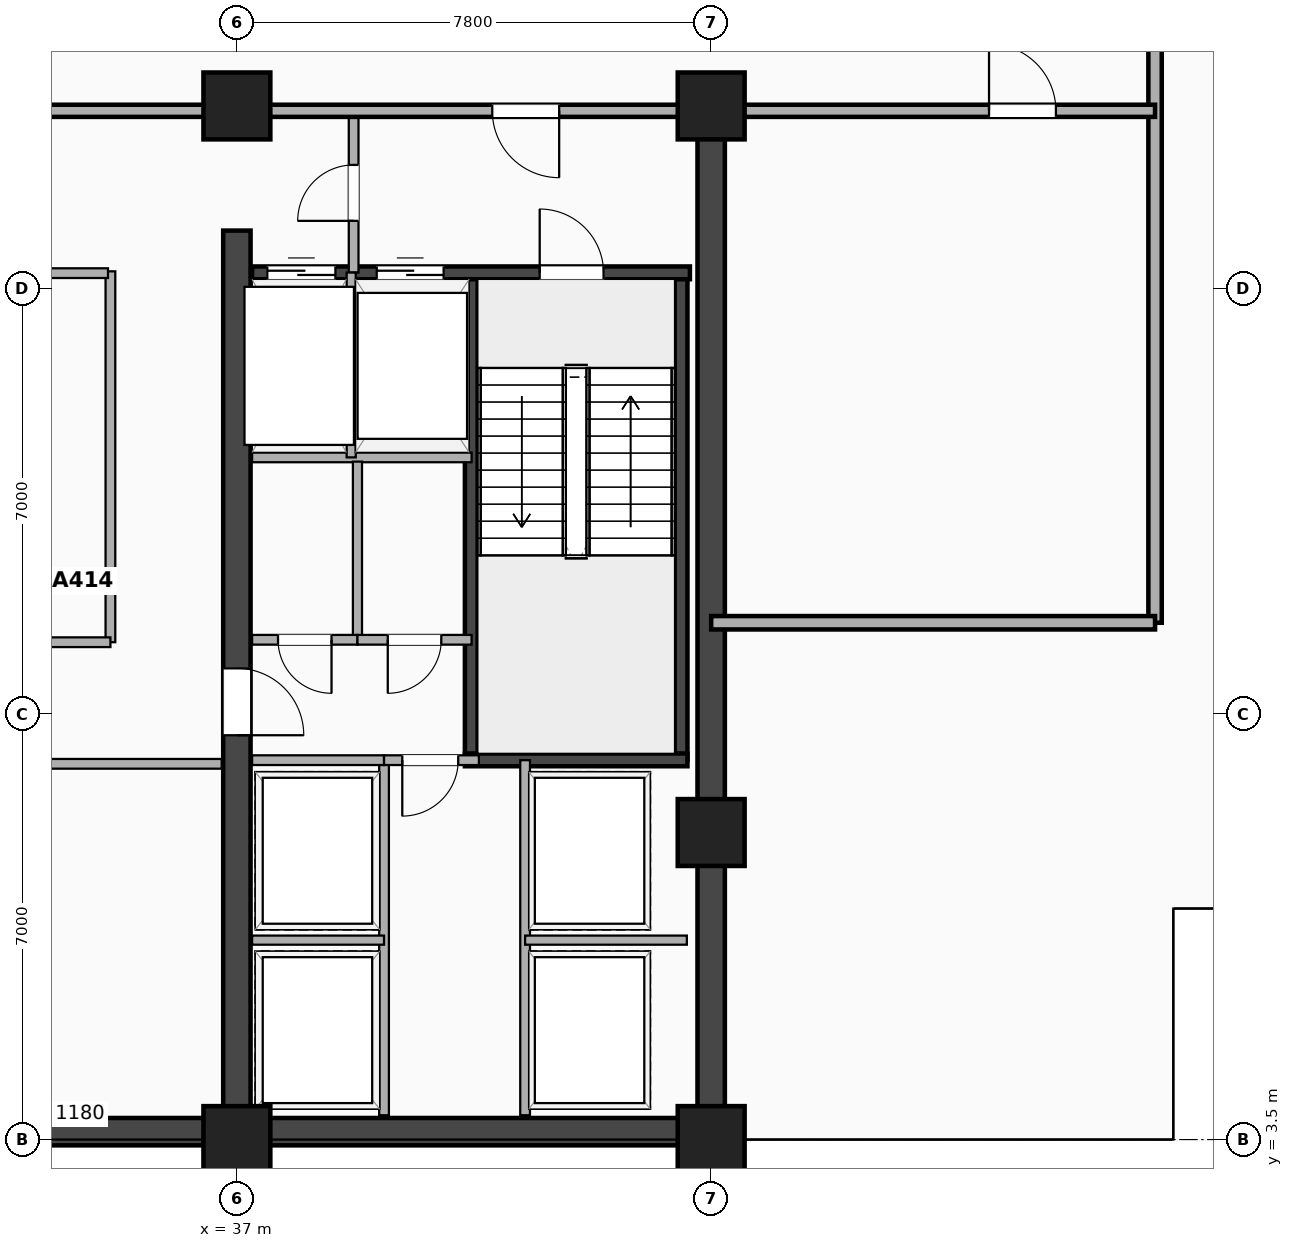
"""IFC4 building model, lengths in metres.
Left out: names, types, materials, properties, quantities, classifications, styles, units other than length and angle.
Written with IfcOpenShell. Run it as: python <this file> out.ifc"""

import sys

from ifc_helpers import new_model, si_unit, direction, frame, frame_2d, origin, origin_2d, place, context, subcontext, project, spatial, rectangle, extrude, element, fill, save


model = new_model("IFC4")
c1 = context("Model", 3, precision=1e-05, world=origin(), true_north=direction((0.0, 1.0)))
c2 = subcontext(c1, "Body", "Model", "MODEL_VIEW")
j1 = project(units=[si_unit("LENGTHUNIT", "METRE"), si_unit("PLANEANGLEUNIT", "RADIAN")], contexts=[c1])
p1 = place(None, origin())
s1 = spatial("IfcSite", under=j1, at=p1, CompositionType="ELEMENT")
p2 = place(p1, origin())
s2 = spatial("IfcBuilding", under=s1, at=p2, CompositionType="ELEMENT")
p3 = place(p2, frame((0.0, 0.0, 184.1)))
s3 = spatial("IfcBuildingStorey", under=s2, at=p3, CompositionType="ELEMENT", Elevation=184.1)
p4 = place(p3, frame((20.3, 3.63, 0.0), z_axis=(0.0, 0.0, 1.0), x_axis=(1.0, 0.0, 0.0)))
e1 = element("IfcWall", 1, at=p4, inside=s3, PredefinedType="SHEAR", context=c2, shape_type="SweptSolid", body=[
    extrude(rectangle(XDim=24.5, YDim=0.45, at=frame_2d((12.25, 0.0))), origin(), (0.0, 0.0, 1.0), 8.16),
])
p5 = place(p3, frame((44.8, 3.5, 0.0), z_axis=(0.0, 0.0, 1.0), x_axis=(0.0, 1.0, 0.0)))
e2 = element("IfcWall", 2, at=p5, inside=s3, PredefinedType="SHEAR", context=c2, shape_type="SweptSolid", body=[
    extrude(rectangle(XDim=16.9, YDim=0.45, at=frame_2d((8.45, 0.0))), origin(), (0.0, 0.0, 1.0), 8.16),
])
p6 = place(p3, frame((37.0, 3.5, 0.0), z_axis=(0.0, 0.0, 1.0), x_axis=(0.0, 1.0, 0.0)))
e3 = element("IfcWall", 3, at=p6, inside=s3, PredefinedType="SHEAR", context=c2, shape_type="SweptSolid", body=[
    extrude(rectangle(XDim=14.95, YDim=0.45, at=frame_2d((7.475, 0.0))), origin(), (0.0, 0.0, 1.0), 8.16),
])
p7 = place(p6, frame((6.65, 0.0, 0.0)))
e4 = element("IfcOpeningElement", 4, at=p7, cuts=e3, PredefinedType="OPENING", context=c2, shape_type="SweptSolid", body=[
    extrude(rectangle(XDim=1.1, YDim=2.15, at=frame_2d((0.55, 1.075))), frame((0.0, 0.235, 0.0), z_axis=(0.0, -1.0, 0.0), x_axis=(1.0, 0.0, 0.0)), (0.0, 0.0, 1.0), 0.47),
])
for number, where, z_axis, x_axis in (
    (5, (40.855, 9.745, 0.0), (0.0, 0.0, 1.0), (0.0, 1.0, 0.0)),
    (6, (44.305, 9.745, 0.0), (0.0, 0.0, 1.0), (0.0, 1.0, 0.0)),
):
    element("IfcWall", number, at=place(p3, frame(where, z_axis=z_axis, x_axis=x_axis)), inside=s3, PredefinedType="SHEAR", context=c2, shape_type="SweptSolid", body=[
        extrude(rectangle(XDim=8.01, YDim=0.21, at=frame_2d((4.005, 0.0))), origin(), (0.0, 0.0, 1.0), 8.16),
    ])
p8 = place(p3, frame((40.75, 9.745, 0.0), z_axis=(0.0, 0.0, 1.0), x_axis=(1.0, 0.0, 0.0)))
e7 = element("IfcWall", 7, at=p8, inside=s3, PredefinedType="SHEAR", context=c2, shape_type="SweptSolid", body=[
    extrude(rectangle(XDim=3.66, YDim=0.21, at=frame_2d((1.83, 0.0))), origin(), (0.0, 0.0, 1.0), 8.16),
])
p9 = place(p3, frame((37.25, 17.755, 0.0), z_axis=(0.0, 0.0, 1.0), x_axis=(1.0, 0.0, 0.0)))
e8 = element("IfcWall", 8, at=p9, inside=s3, PredefinedType="SHEAR", context=c2, shape_type="SweptSolid", body=[
    extrude(rectangle(XDim=7.2, YDim=0.21, at=frame_2d((3.6, 0.0))), origin(), (0.0, 0.0, 1.0), 8.16),
])
p10 = place(p9, frame((0.25, 0.0, 0.0)))
e9 = element("IfcOpeningElement", 9, at=p10, cuts=e8, PredefinedType="OPENING", context=c2, shape_type="SweptSolid", body=[
    extrude(rectangle(XDim=1.12, YDim=2.2, at=frame_2d((0.56, 1.1))), frame((0.0, 0.115, 0.0), z_axis=(0.0, -1.0, 0.0), x_axis=(1.0, 0.0, 0.0)), (0.0, 0.0, 1.0), 0.23),
])
p11 = place(p9, frame((2.05, 0.0, 0.0)))
e10 = element("IfcOpeningElement", 10, at=p11, cuts=e8, PredefinedType="OPENING", context=c2, shape_type="SweptSolid", body=[
    extrude(rectangle(XDim=1.1, YDim=2.18, at=frame_2d((0.55, 1.09))), frame((0.0, 0.115, 0.0), z_axis=(0.0, -1.0, 0.0), x_axis=(1.0, 0.0, 0.0)), (0.0, 0.0, 1.0), 0.23),
])
p12 = place(p9, frame((5.78, 0.0, 0.0), z_axis=(0.0, 0.0, 1.0), x_axis=(-1.0, 0.0, 0.0)))
e11 = element("IfcOpeningElement", 11, at=p12, cuts=e8, PredefinedType="OPENING", context=c2, shape_type="SweptSolid", body=[
    extrude(rectangle(XDim=1.05, YDim=2.15, at=frame_2d((0.525, 1.075))), frame((0.0, 0.115, 0.0), z_axis=(0.0, -1.0, 0.0), x_axis=(1.0, 0.0, 0.0)), (0.0, 0.0, 1.0), 0.23),
])
for number, where, z_axis, x_axis in (
    (12, (37.0, 3.5, -0.32), (0.0, 0.0, 1.0), (1.0, 0.0, 0.0)),
    (13, (44.8, 3.5, -0.32), (0.0, 0.0, 1.0), (1.0, 0.0, 0.0)),
    (14, (44.8, 8.55, -0.32), (0.0, 0.0, 1.0), (1.0, 0.0, 0.0)),
    (15, (37.0, 20.5, -0.32), (0.0, 0.0, 1.0), (1.0, 0.0, 0.0)),
    (16, (44.8, 20.5, -0.32), (0.0, 0.0, 1.0), (1.0, 0.0, 0.0)),
):
    element("IfcColumn", number, at=place(p3, frame(where, z_axis=z_axis, x_axis=x_axis)), inside=s3, PredefinedType="COLUMN", context=c2, shape_type="SweptSolid", body=[
        extrude(rectangle(XDim=1.1, YDim=1.1, at=origin_2d()), origin(), (0.0, 0.0, 1.0), 8.48),
    ])
p13 = place(p3, frame((38.92, 17.76, 0.0), z_axis=(0.0, 0.0, 1.0), x_axis=(0.0, 1.0, 0.0)))
e17 = element("IfcWall", 17, at=p13, inside=s3, PredefinedType="PARTITIONING", context=c2, shape_type="SweptSolid", body=[
    extrude(rectangle(XDim=2.66, YDim=0.16, at=frame_2d((1.33, 0.0))), origin(), (0.0, 0.0, 1.0), 7.602),
])
p14 = place(p13, frame((1.77, 0.0, 0.0), z_axis=(0.0, 0.0, 1.0), x_axis=(-1.0, 0.0, 0.0)))
e18 = element("IfcOpeningElement", 18, at=p14, cuts=e17, PredefinedType="OPENING", context=c2, shape_type="SweptSolid", body=[
    extrude(rectangle(XDim=0.92, YDim=2.08, at=frame_2d((0.46, 1.04))), frame((0.0, 0.09, 0.0), z_axis=(0.0, -1.0, 0.0), x_axis=(1.0, 0.0, 0.0)), (0.0, 0.0, 1.0), 0.18),
])
p15 = place(p3, frame((37.25, 14.72, 0.0), z_axis=(0.0, 0.0, 1.0), x_axis=(1.0, 0.0, 0.0)))
e19 = element("IfcWall", 19, at=p15, inside=s3, PredefinedType="PARTITIONING", context=c2, shape_type="SweptSolid", body=[
    extrude(rectangle(XDim=3.61, YDim=0.16, at=frame_2d((1.805, 0.0))), origin(), (0.0, 0.0, 1.0), 8.16),
])
p16 = place(p3, frame((38.88, 14.72, 0.0), z_axis=(0.0, 0.0, 1.0), x_axis=(0.0, 1.0, 0.0)))
e20 = element("IfcWall", 20, at=p16, inside=s3, PredefinedType="PARTITIONING", context=c2, shape_type="SweptSolid", body=[
    extrude(rectangle(XDim=3.04, YDim=0.15, at=frame_2d((1.52, 0.0))), origin(), (0.0, 0.0, 1.0), 8.16),
])
p17 = place(p3, frame((29.2, 20.42, 0.0), z_axis=(0.0, 0.0, 1.0), x_axis=(1.0, 0.0, 0.0)))
e21 = element("IfcWall", 21, at=p17, inside=s3, PredefinedType="PARTITIONING", context=c2, shape_type="SweptSolid", body=[
    extrude(rectangle(XDim=7.8, YDim=0.2, at=frame_2d((3.9, 0.0))), origin(), (0.0, 0.0, 1.0), 7.29),
])
p18 = place(p17, frame((3.409, 0.0, 0.0)))
e22 = element("IfcOpeningElement", 22, at=p18, cuts=e21, PredefinedType="OPENING", context=c2, shape_type="SweptSolid", body=[
    extrude(rectangle(XDim=1.1, YDim=2.15, at=frame_2d((0.55, 1.075))), frame((0.0, 0.11, 0.0), z_axis=(0.0, -1.0, 0.0), x_axis=(1.0, 0.0, 0.0)), (0.0, 0.0, 1.0), 0.22),
])
p19 = place(p3, frame((37.0, 20.42, 0.0), z_axis=(0.0, 0.0, 1.0), x_axis=(1.0, 0.0, 0.0)))
e23 = element("IfcWall", 23, at=p19, inside=s3, PredefinedType="PARTITIONING", context=c2, shape_type="SweptSolid", body=[
    extrude(rectangle(XDim=7.45, YDim=0.2, at=frame_2d((3.725, 0.0))), origin(), (0.0, 0.0, 1.0), 6.465),
])
p20 = place(p19, frame((4.2, 0.0, 0.0)))
e24 = element("IfcOpeningElement", 24, at=p20, cuts=e23, PredefinedType="OPENING", context=c2, shape_type="SweptSolid", body=[
    extrude(rectangle(XDim=1.1, YDim=2.15, at=frame_2d((0.55, 1.075))), frame((0.0, 0.11, 0.0), z_axis=(0.0, -1.0, 0.0), x_axis=(1.0, 0.0, 0.0)), (0.0, 0.0, 1.0), 0.22),
])
p21 = place(p3, frame((38.983, 11.72, 0.0), z_axis=(0.0, 0.0, 1.0), x_axis=(0.0, 1.0, 0.0)))
e25 = element("IfcWall", 25, at=p21, inside=s3, PredefinedType="PARTITIONING", context=c2, shape_type="SweptSolid", body=[
    extrude(rectangle(XDim=2.93, YDim=0.15, at=frame_2d((1.465, 0.0))), origin(), (0.0, 0.0, 1.0), 8.16),
])
p22 = place(p3, frame((37.25, 11.72, 0.0), z_axis=(0.0, 0.0, 1.0), x_axis=(1.0, 0.0, 0.0)))
e26 = element("IfcWall", 26, at=p22, inside=s3, PredefinedType="PARTITIONING", context=c2, shape_type="SweptSolid", body=[
    extrude(rectangle(XDim=1.733, YDim=0.16, at=frame_2d((0.866, 0.0))), origin(), (0.0, 0.0, 1.0), 8.16),
])
p23 = place(p22, frame((0.427, 0.0, 0.0)))
e27 = element("IfcOpeningElement", 27, at=p23, cuts=e26, PredefinedType="OPENING", context=c2, shape_type="SweptSolid", body=[
    extrude(rectangle(XDim=0.88, YDim=2.08, at=frame_2d((0.44, 1.04))), frame((0.0, 0.09, 0.0), z_axis=(0.0, -1.0, 0.0), x_axis=(1.0, 0.0, 0.0)), (0.0, 0.0, 1.0), 0.18),
])
p24 = place(p3, frame((38.983, 11.72, 0.0), z_axis=(0.0, 0.0, 1.0), x_axis=(1.0, 0.0, 0.0)))
e28 = element("IfcWall", 28, at=p24, inside=s3, PredefinedType="PARTITIONING", context=c2, shape_type="SweptSolid", body=[
    extrude(rectangle(XDim=1.877, YDim=0.16, at=frame_2d((0.938, 0.0))), origin(), (0.0, 0.0, 1.0), 8.16),
])
p25 = place(p24, frame((0.499, 0.0, 0.0)))
e29 = element("IfcOpeningElement", 29, at=p25, cuts=e28, PredefinedType="OPENING", context=c2, shape_type="SweptSolid", body=[
    extrude(rectangle(XDim=0.88, YDim=2.08, at=frame_2d((0.44, 1.04))), frame((0.0, 0.09, 0.0), z_axis=(0.0, -1.0, 0.0), x_axis=(1.0, 0.0, 0.0)), (0.0, 0.0, 1.0), 0.18),
])
for number, where, z_axis, x_axis in (
    (30, (39.42, 3.9, 0.0), (0.0, 0.0, 1.0), (0.0, 1.0, 0.0)),
    (31, (41.74, 3.9, 0.0), (0.0, 0.0, 1.0), (0.0, 1.0, 0.0)),
):
    element("IfcWall", number, at=place(p3, frame(where, z_axis=z_axis, x_axis=x_axis)), inside=s3, PredefinedType="PARTITIONING", context=c2, shape_type="SweptSolid", body=[
        extrude(rectangle(XDim=5.84, YDim=0.16, at=frame_2d((2.92, 0.0))), origin(), (0.0, 0.0, 1.0), 8.16),
    ])
p26 = place(p3, frame((37.25, 6.78, 0.0), z_axis=(0.0, 0.0, 1.0), x_axis=(1.0, 0.0, 0.0)))
e32 = element("IfcWall", 32, at=p26, inside=s3, PredefinedType="PARTITIONING", context=c2, shape_type="SweptSolid", body=[
    extrude(rectangle(XDim=2.17, YDim=0.15, at=frame_2d((1.085, 0.0))), origin(), (0.0, 0.0, 1.0), 8.16),
])
p27 = place(p3, frame((41.74, 6.78, 0.0), z_axis=(0.0, 0.0, 1.0), x_axis=(1.0, 0.0, 0.0)))
e33 = element("IfcWall", 33, at=p27, inside=s3, PredefinedType="PARTITIONING", context=c2, shape_type="SweptSolid", body=[
    extrude(rectangle(XDim=2.66, YDim=0.15, at=frame_2d((1.33, 0.0))), origin(), (0.0, 0.0, 1.0), 6.465),
])
p28 = place(p3, frame((37.25, 9.74, 0.0), z_axis=(0.0, 0.0, 1.0), x_axis=(1.0, 0.0, 0.0)))
e34 = element("IfcWall", 34, at=p28, inside=s3, PredefinedType="PARTITIONING", context=c2, shape_type="SweptSolid", body=[
    extrude(rectangle(XDim=2.17, YDim=0.16, at=frame_2d((1.085, 0.0))), origin(), (0.0, 0.0, 1.0), 8.16),
])
p29 = place(p3, frame((39.42, 9.74, 0.0), z_axis=(0.0, 0.0, 1.0), x_axis=(1.0, 0.0, 0.0)))
e35 = element("IfcWall", 35, at=p29, inside=s3, PredefinedType="PARTITIONING", context=c2, shape_type="SweptSolid", body=[
    extrude(rectangle(XDim=1.56, YDim=0.16, at=frame_2d((0.78, 0.0))), origin(), (0.0, 0.0, 1.0), 8.16),
])
p30 = place(p29, frame((0.3, 0.0, 0.0)))
e36 = element("IfcOpeningElement", 36, at=p30, cuts=e35, PredefinedType="OPENING", context=c2, shape_type="SweptSolid", body=[
    extrude(rectangle(XDim=0.92, YDim=2.08, at=frame_2d((0.46, 1.04))), frame((0.0, 0.09, 0.0), z_axis=(0.0, -1.0, 0.0), x_axis=(1.0, 0.0, 0.0)), (0.0, 0.0, 1.0), 0.18),
])
p31 = place(p3, frame((34.92, 11.68, 0.0), z_axis=(0.0, 0.0, 1.0), x_axis=(0.0, 1.0, 0.0)))
e37 = element("IfcWall", 37, at=p31, inside=s3, PredefinedType="PARTITIONING", context=c2, shape_type="SweptSolid", body=[
    extrude(rectangle(XDim=6.1, YDim=0.16, at=frame_2d((3.05, 0.0))), origin(), (0.0, 0.0, 1.0), 8.16),
])
p32 = place(p3, frame((29.45, 9.68, 0.0), z_axis=(0.0, 0.0, 1.0), x_axis=(1.0, 0.0, 0.0)))
e38 = element("IfcWall", 38, at=p32, inside=s3, PredefinedType="PARTITIONING", context=c2, shape_type="SweptSolid", body=[
    extrude(rectangle(XDim=7.3, YDim=0.16, at=frame_2d((3.65, 0.0))), origin(), (0.0, 0.0, 1.0), 8.16),
])
p33 = place(p32, frame((4.11, 0.0, 0.0), z_axis=(0.0, 0.0, 1.0), x_axis=(-1.0, 0.0, 0.0)))
e39 = element("IfcOpeningElement", 39, at=p33, cuts=e38, PredefinedType="OPENING", context=c2, shape_type="SweptSolid", body=[
    extrude(rectangle(XDim=0.92, YDim=2.08, at=frame_2d((0.46, 1.04))), frame((0.0, 0.09, 0.0), z_axis=(0.0, -1.0, 0.0), x_axis=(1.0, 0.0, 0.0)), (0.0, 0.0, 1.0), 0.18),
])
p34 = place(p3, frame((29.2, 11.68, 0.0), z_axis=(0.0, 0.0, 1.0), x_axis=(1.0, 0.0, 0.0)))
e40 = element("IfcWall", 40, at=p34, inside=s3, PredefinedType="PARTITIONING", context=c2, shape_type="SweptSolid", body=[
    extrude(rectangle(XDim=5.72, YDim=0.16, at=frame_2d((2.86, 0.0))), origin(), (0.0, 0.0, 1.0), 8.16),
])
p35 = place(p3, frame((29.45, 17.75, 0.0), z_axis=(0.0, 0.0, 1.0), x_axis=(1.0, 0.0, 0.0)))
e41 = element("IfcWall", 41, at=p35, inside=s3, PredefinedType="PARTITIONING", context=c2, shape_type="SweptSolid", body=[
    extrude(rectangle(XDim=5.43, YDim=0.16, at=frame_2d((2.715, 0.0))), origin(), (0.0, 0.0, 1.0), 8.16),
])
p36 = place(p35, frame((3.175, 0.0, 0.0), z_axis=(0.0, 0.0, 1.0), x_axis=(-1.0, 0.0, 0.0)))
e42 = element("IfcOpeningElement", 42, at=p36, cuts=e41, PredefinedType="OPENING", context=c2, shape_type="SweptSolid", body=[
    extrude(rectangle(XDim=0.92, YDim=2.08, at=frame_2d((0.46, 1.04))), frame((0.0, 0.09, 0.0), z_axis=(0.0, -1.0, 0.0), x_axis=(1.0, 0.0, 0.0)), (0.0, 0.0, 1.0), 0.18),
])
p37 = place(p3, frame((52.1, 12.0, 0.0), z_axis=(0.0, 0.0, 1.0), x_axis=(0.0, 1.0, 0.0)))
e43 = element("IfcWall", 43, at=p37, inside=s3, PredefinedType="PARTITIONING", context=c2, shape_type="SweptSolid", body=[
    extrude(rectangle(XDim=20.8, YDim=0.22, at=frame_2d((10.4, 0.0))), origin(), (0.0, 0.0, 1.0), 6.465),
])
p38 = place(p3, frame((44.8, 12.0, 0.0), z_axis=(0.0, 0.0, 1.0), x_axis=(1.0, 0.0, 0.0)))
e44 = element("IfcWall", 44, at=p38, inside=s3, PredefinedType="PARTITIONING", context=c2, shape_type="SweptSolid", body=[
    extrude(rectangle(XDim=7.3, YDim=0.22, at=frame_2d((3.65, 0.0))), origin(), (0.0, 0.0, 1.0), 6.465),
])
p39 = place(p3, frame((44.8, 20.42, 0.0), z_axis=(0.0, 0.0, 1.0), x_axis=(1.0, 0.0, 0.0)))
e45 = element("IfcWall", 45, at=p39, inside=s3, PredefinedType="PARTITIONING", context=c2, shape_type="SweptSolid", body=[
    extrude(rectangle(XDim=7.3, YDim=0.2, at=frame_2d((3.65, 0.0))), origin(), (0.0, 0.0, 1.0), 6.465),
])
p40 = place(p39, frame((5.669, 0.0, 0.0), z_axis=(0.0, 0.0, 1.0), x_axis=(-1.0, 0.0, 0.0)))
e46 = element("IfcOpeningElement", 46, at=p40, cuts=e45, PredefinedType="OPENING", context=c2, shape_type="SweptSolid", body=[
    extrude(rectangle(XDim=1.1, YDim=2.15, at=frame_2d((0.55, 1.075))), frame((0.0, 0.11, 0.0), z_axis=(0.0, -1.0, 0.0), x_axis=(1.0, 0.0, 0.0)), (0.0, 0.0, 1.0), 0.22),
])
p41 = place(p10, origin())
e47 = element("IfcDoor", 47, at=p41, inside=s3, OperationType="DOUBLE_DOOR_SLIDING", PredefinedType="DOOR", context=c2, shape_type="SweptSolid", body=[
    extrude(rectangle(XDim=1.12, YDim=2.2, at=frame_2d((0.56, 1.1))), frame((0.0, 0.025, 0.0), z_axis=(0.0, -1.0, 0.0), x_axis=(1.0, 0.0, 0.0)), (0.0, 0.0, 1.0), 0.05),
])
fill(e9, e47)
p42 = place(p11, origin())
e48 = element("IfcDoor", 48, at=p42, inside=s3, OperationType="DOUBLE_DOOR_SLIDING", PredefinedType="DOOR", context=c2, shape_type="SweptSolid", body=[
    extrude(rectangle(XDim=1.1, YDim=2.18, at=frame_2d((0.55, 1.09))), frame((0.0, 0.025, 0.0), z_axis=(0.0, -1.0, 0.0), x_axis=(1.0, 0.0, 0.0)), (0.0, 0.0, 1.0), 0.05),
])
fill(e10, e48)
p43 = place(p12, origin())
e49 = element("IfcDoor", 49, at=p43, inside=s3, OperationType="SINGLE_SWING_LEFT", PredefinedType="DOOR", context=c2, shape_type="SweptSolid", body=[
    extrude(rectangle(XDim=1.05, YDim=2.15, at=frame_2d((0.525, 1.075))), frame((0.0, 0.025, 0.0), z_axis=(0.0, -1.0, 0.0), x_axis=(1.0, 0.0, 0.0)), (0.0, 0.0, 1.0), 0.05),
])
fill(e11, e49)
p44 = place(p7, origin())
e50 = element("IfcDoor", 50, at=p44, inside=s3, OperationType="SINGLE_SWING_LEFT", PredefinedType="DOOR", context=c2, shape_type="SweptSolid", body=[
    extrude(rectangle(XDim=1.1, YDim=2.15, at=frame_2d((0.55, 1.075))), frame((0.0, 0.025, 0.0), z_axis=(0.0, -1.0, 0.0), x_axis=(1.0, 0.0, 0.0)), (0.0, 0.0, 1.0), 0.05),
])
fill(e4, e50)
p45 = place(p14, origin())
e51 = element("IfcDoor", 51, at=p45, inside=s3, OperationType="SINGLE_SWING_LEFT", PredefinedType="DOOR", context=c2, shape_type="SweptSolid", body=[
    extrude(rectangle(XDim=0.92, YDim=2.08, at=frame_2d((0.46, 1.04))), frame((0.0, 0.025, 0.0), z_axis=(0.0, -1.0, 0.0), x_axis=(1.0, 0.0, 0.0)), (0.0, 0.0, 1.0), 0.05),
])
fill(e18, e51)
p46 = place(p20, origin())
e52 = element("IfcDoor", 52, at=p46, inside=s3, OperationType="SINGLE_SWING_RIGHT", PredefinedType="DOOR", context=c2, shape_type="SweptSolid", body=[
    extrude(rectangle(XDim=1.1, YDim=2.15, at=frame_2d((0.55, 1.075))), frame((0.0, 0.025, 0.0), z_axis=(0.0, -1.0, 0.0), x_axis=(1.0, 0.0, 0.0)), (0.0, 0.0, 1.0), 0.05),
])
fill(e24, e52)
p47 = place(p23, origin())
e53 = element("IfcDoor", 53, at=p47, inside=s3, OperationType="SINGLE_SWING_RIGHT", PredefinedType="DOOR", context=c2, shape_type="SweptSolid", body=[
    extrude(rectangle(XDim=0.88, YDim=2.08, at=frame_2d((0.44, 1.04))), frame((0.0, 0.025, 0.0), z_axis=(0.0, -1.0, 0.0), x_axis=(1.0, 0.0, 0.0)), (0.0, 0.0, 1.0), 0.05),
])
fill(e27, e53)
p48 = place(p25, origin())
e54 = element("IfcDoor", 54, at=p48, inside=s3, OperationType="SINGLE_SWING_LEFT", PredefinedType="DOOR", context=c2, shape_type="SweptSolid", body=[
    extrude(rectangle(XDim=0.88, YDim=2.08, at=frame_2d((0.44, 1.04))), frame((0.0, 0.025, 0.0), z_axis=(0.0, -1.0, 0.0), x_axis=(1.0, 0.0, 0.0)), (0.0, 0.0, 1.0), 0.05),
])
fill(e29, e54)
p49 = place(p30, origin())
e55 = element("IfcDoor", 55, at=p49, inside=s3, OperationType="SINGLE_SWING_LEFT", PredefinedType="DOOR", context=c2, shape_type="SweptSolid", body=[
    extrude(rectangle(XDim=0.92, YDim=2.08, at=frame_2d((0.46, 1.04))), frame((0.0, 0.025, 0.0), z_axis=(0.0, -1.0, 0.0), x_axis=(1.0, 0.0, 0.0)), (0.0, 0.0, 1.0), 0.05),
])
fill(e36, e55)
p50 = place(p40, origin())
e56 = element("IfcDoor", 56, at=p50, inside=s3, OperationType="SINGLE_SWING_LEFT", PredefinedType="DOOR", context=c2, shape_type="SweptSolid", body=[
    extrude(rectangle(XDim=1.1, YDim=2.15, at=frame_2d((0.55, 1.075))), frame((0.0, 0.025, 0.0), z_axis=(0.0, -1.0, 0.0), x_axis=(1.0, 0.0, 0.0)), (0.0, 0.0, 1.0), 0.05),
])
fill(e46, e56)
save(model, sys.argv[1])
